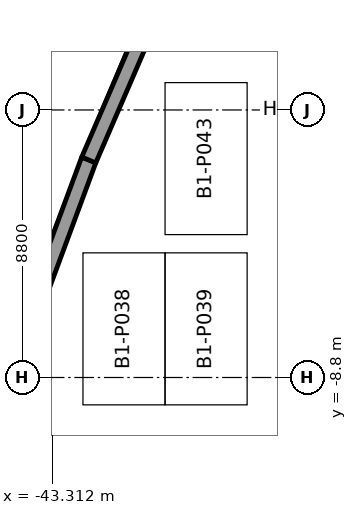
"""IFC4 building model, lengths in metres.
Left out: names, types, materials, properties, quantities, classifications, styles, units other than length and angle.
Written with IfcOpenShell. Run it as: python <this file> out.ifc"""

import sys

from ifc_helpers import new_model, si_unit, direction, frame, frame_2d, origin, place, context, subcontext, project, spatial, rectangle, extrude, element, save


model = new_model("IFC4")
c1 = context("Model", 3, precision=1e-05, world=origin(), true_north=direction((0.0, 1.0)))
c2 = subcontext(c1, "Body", "Model", "MODEL_VIEW")
j1 = project(units=[si_unit("LENGTHUNIT", "METRE"), si_unit("PLANEANGLEUNIT", "RADIAN")], contexts=[c1])
p1 = place(None, origin())
s1 = spatial("IfcSite", under=j1, at=p1, CompositionType="ELEMENT")
p2 = place(p1, origin())
s2 = spatial("IfcBuilding", under=s1, at=p2, CompositionType="ELEMENT")
p3 = place(p2, frame((0.0, 0.0, -4.5)))
s3 = spatial("IfcBuildingStorey", under=s2, at=p3, CompositionType="ELEMENT", Elevation=-4.5)
p4 = place(p3, frame((-45.012, -9.482, 0.0), z_axis=(0.0, 0.0, 1.0), x_axis=(0.347237291218, 0.937777299569, 0.0)))
e1 = element("IfcWall", 1, at=p4, inside=s3, PredefinedType="SOLIDWALL", context=c2, shape_type="SweptSolid", body=[
    extrude(rectangle(XDim=8.358, YDim=0.5, at=frame_2d((4.179, 0.0))), origin(), (0.0, 0.0, 1.0), 4.5),
])
p5 = place(p3, frame((-42.11, -1.644, 0.0), z_axis=(0.0, 0.0, 1.0), x_axis=(0.396582550064, 0.917999063717, 0.0)))
e2 = element("IfcWall", 2, at=p5, inside=s3, PredefinedType="SOLIDWALL", context=c2, shape_type="SweptSolid", body=[
    extrude(rectangle(XDim=8.425, YDim=0.5, at=frame_2d((4.213, 0.0))), origin(), (0.0, 0.0, 1.0), 4.5),
])
save(model, sys.argv[1])
